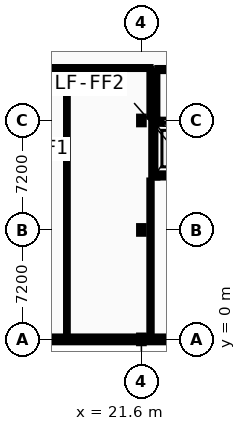
"""IFC4 building model, lengths in metres.
Left out: names, types, materials, properties, quantities, classifications, styles, units other than length and angle.
Written with IfcOpenShell. Run it as: python <this file> out.ifc"""

import sys

from ifc_helpers import new_model, si_unit, direction, frame, frame_2d, origin, origin_2d, place, context, subcontext, project, spatial, rectangle, i_section, extrude, element, fill, save


model = new_model("IFC4")
c1 = context("Model", 3, precision=1e-05, world=origin(), true_north=direction((0.0, 1.0)))
c2 = subcontext(c1, "Body", "Model", "MODEL_VIEW")
j1 = project(units=[si_unit("LENGTHUNIT", "METRE"), si_unit("PLANEANGLEUNIT", "RADIAN")], contexts=[c1])
p1 = place(None, origin())
s1 = spatial("IfcSite", under=j1, at=p1, CompositionType="ELEMENT")
p2 = place(p1, origin())
s2 = spatial("IfcBuilding", under=s1, at=p2, CompositionType="ELEMENT")
p3 = place(p2, frame((0.0, 0.0, 5.2)))
s3 = spatial("IfcBuildingStorey", under=s2, at=p3, CompositionType="ELEMENT", Elevation=5.2)
for number, where, z_axis, x_axis in (
    (1, (21.6, 0.0, 0.0), (0.0, 0.0, 1.0), (1.0, 0.0, 0.0)),
    (2, (21.6, 7.2, 0.0), (0.0, 0.0, 1.0), (1.0, 0.0, 0.0)),
    (3, (21.6, 14.4, 0.0), (0.0, 0.0, 1.0), (1.0, 0.0, 0.0)),
):
    element("IfcColumn", number, at=place(p3, frame(where, z_axis=z_axis, x_axis=x_axis)), inside=s3, PredefinedType="COLUMN", context=c2, shape_type="SweptSolid", body=[
        extrude(i_section(OverallWidth=0.3, OverallDepth=0.5, WebThickness=0.014, FlangeThickness=0.028, FilletRadius=0.027, at=origin_2d()), origin(), (0.0, 0.0, 1.0), 4.4),
    ])
p4 = place(p3, frame((14.4, 0.0, 0.0), z_axis=(0.0, 0.0, 1.0), x_axis=(1.0, 0.0, 0.0)))
e4 = element("IfcWall", 4, at=p4, inside=s3, PredefinedType="STANDARD", context=c2, shape_type="SweptSolid", body=[
    extrude(rectangle(XDim=7.2, YDim=0.38, at=frame_2d((3.6, 0.0))), origin(), (0.0, 0.0, 1.0), 3.88),
])
p5 = place(p3, frame((21.6, 0.0, 0.0), z_axis=(0.0, 0.0, 1.0), x_axis=(1.0, 0.0, 0.0)))
e5 = element("IfcWall", 5, at=p5, inside=s3, PredefinedType="STANDARD", context=c2, shape_type="SweptSolid", body=[
    extrude(rectangle(XDim=7.01, YDim=0.38, at=frame_2d((3.505, 0.0))), origin(), (0.0, 0.0, 1.0), 3.88),
])
p6 = place(p5, frame((1.537, 0.0, 0.95)))
e6 = element("IfcOpeningElement", 6, at=p6, cuts=e5, PredefinedType="OPENING", context=c2, shape_type="SweptSolid", body=[
    extrude(rectangle(XDim=1.132, YDim=1.26, at=frame_2d((0.566, 0.63))), frame((0.0, 0.2, 0.0), z_axis=(0.0, -1.0, 0.0), x_axis=(1.0, 0.0, 0.0)), (0.0, 0.0, 1.0), 0.4),
])
p7 = place(p5, frame((4.341, 0.0, 0.95)))
e7 = element("IfcOpeningElement", 7, at=p7, cuts=e5, PredefinedType="OPENING", context=c2, shape_type="SweptSolid", body=[
    extrude(rectangle(XDim=1.132, YDim=1.26, at=frame_2d((0.566, 0.63))), frame((0.0, 0.2, 0.0), z_axis=(0.0, -1.0, 0.0), x_axis=(1.0, 0.0, 0.0)), (0.0, 0.0, 1.0), 0.4),
])
p8 = place(p3, frame((22.65, 10.85, 0.0), z_axis=(0.0, 0.0, 1.0), x_axis=(1.0, 0.0, 0.0)))
e8 = element("IfcWall", 8, at=p8, inside=s3, PredefinedType="SHEAR", context=c2, shape_type="SweptSolid", body=[
    extrude(rectangle(XDim=2.2, YDim=0.4, at=frame_2d((1.1, 0.0))), origin(), (0.0, 0.0, 1.0), 4.185),
])
p9 = place(p3, frame((22.65, 14.25, 0.0), z_axis=(0.0, 0.0, 1.0), x_axis=(1.0, 0.0, 0.0)))
e9 = element("IfcWall", 9, at=p9, inside=s3, PredefinedType="SHEAR", context=c2, shape_type="SweptSolid", body=[
    extrude(rectangle(XDim=2.2, YDim=0.4, at=frame_2d((1.1, 0.0))), origin(), (0.0, 0.0, 1.0), 4.185),
])
p10 = place(p9, frame((0.4, 0.0, 0.0)))
e10 = element("IfcOpeningElement", 10, at=p10, cuts=e9, PredefinedType="OPENING", context=c2, shape_type="SweptSolid", body=[
    extrude(rectangle(XDim=1.4, YDim=2.2, at=frame_2d((0.7, 1.1))), frame((0.0, 0.21, 0.0), z_axis=(0.0, -1.0, 0.0), x_axis=(1.0, 0.0, 0.0)), (0.0, 0.0, 1.0), 0.42),
])
p11 = place(p3, frame((22.45, 10.65, 0.0), z_axis=(0.0, 0.0, 1.0), x_axis=(0.0, 1.0, 0.0)))
e11 = element("IfcWall", 11, at=p11, inside=s3, PredefinedType="SHEAR", context=c2, shape_type="SweptSolid", body=[
    extrude(rectangle(XDim=3.8, YDim=0.4, at=frame_2d((1.9, 0.0))), origin(), (0.0, 0.0, 1.0), 4.185),
])
p12 = place(p3, frame((22.65, 17.75, 0.0), z_axis=(0.0, 0.0, 1.0), x_axis=(1.0, 0.0, 0.0)))
e12 = element("IfcWall", 12, at=p12, inside=s3, PredefinedType="PARTITIONING", context=c2, shape_type="SweptSolid", body=[
    extrude(rectangle(XDim=5.75, YDim=0.2, at=frame_2d((2.875, 0.0))), origin(), (0.0, 0.0, 1.0), 4.185),
])
p13 = place(p12, frame((2.075, 0.0, 0.0)))
e13 = element("IfcOpeningElement", 13, at=p13, cuts=e12, PredefinedType="OPENING", context=c2, shape_type="SweptSolid", body=[
    extrude(rectangle(XDim=1.6, YDim=2.2, at=frame_2d((0.8, 1.1))), frame((0.0, 0.11, 0.0), z_axis=(0.0, -1.0, 0.0), x_axis=(1.0, 0.0, 0.0)), (0.0, 0.0, 1.0), 0.22),
])
p14 = place(p3, frame((22.55, 14.45, 0.0), z_axis=(0.0, 0.0, 1.0), x_axis=(0.0, 1.0, 0.0)))
e14 = element("IfcWall", 14, at=p14, inside=s3, PredefinedType="PARTITIONING", context=c2, shape_type="SweptSolid", body=[
    extrude(rectangle(XDim=3.2, YDim=0.2, at=frame_2d((1.6, 0.0))), origin(), (0.0, 0.0, 1.0), 4.185),
])
p15 = place(p3, frame((9.45, 17.85, 0.0), z_axis=(0.0, 0.0, 1.0), x_axis=(1.0, 0.0, 0.0)))
e15 = element("IfcWall", 15, at=p15, inside=s3, PredefinedType="PARTITIONING", context=c2, shape_type="SweptSolid", body=[
    extrude(rectangle(XDim=12.75, YDim=0.125, at=frame_2d((6.375, 0.0))), origin(), (0.0, 0.0, 1.0), 4.185),
])
p16 = place(p15, frame((1.2, 0.0, 0.0)))
e16 = element("IfcOpeningElement", 16, at=p16, cuts=e15, PredefinedType="OPENING", context=c2, shape_type="SweptSolid", body=[
    extrude(rectangle(XDim=1.0, YDim=2.1, at=frame_2d((0.5, 1.05))), frame((0.0, 0.073, 0.0), z_axis=(0.0, -1.0, 0.0), x_axis=(1.0, 0.0, 0.0)), (0.0, 0.0, 1.0), 0.145),
])
p17 = place(p15, frame((5.9, 0.0, 0.0)))
e17 = element("IfcOpeningElement", 17, at=p17, cuts=e15, PredefinedType="OPENING", context=c2, shape_type="SweptSolid", body=[
    extrude(rectangle(XDim=0.9, YDim=2.1, at=frame_2d((0.45, 1.05))), frame((0.0, 0.073, 0.0), z_axis=(0.0, -1.0, 0.0), x_axis=(1.0, 0.0, 0.0)), (0.0, 0.0, 1.0), 0.145),
])
p18 = place(p15, frame((7.7, 0.0, 0.0)))
e18 = element("IfcOpeningElement", 18, at=p18, cuts=e15, PredefinedType="OPENING", context=c2, shape_type="SweptSolid", body=[
    extrude(rectangle(XDim=1.192, YDim=2.096, at=frame_2d((0.596, 1.048))), frame((0.0, 0.073, 0.0), z_axis=(0.0, -1.0, 0.0), x_axis=(1.0, 0.0, 0.0)), (0.0, 0.0, 1.0), 0.145),
])
p19 = place(p3, frame((16.7, 0.2, 0.0), z_axis=(0.0, 0.0, 1.0), x_axis=(0.0, 1.0, 0.0)))
e19 = element("IfcWall", 19, at=p19, inside=s3, PredefinedType="PARTITIONING", context=c2, shape_type="SweptSolid", body=[
    extrude(rectangle(XDim=17.588, YDim=0.11, at=frame_2d((8.794, 0.0))), origin(), (0.0, 0.0, 1.0), 3.9),
])
p20 = place(p3, frame((22.2, 0.2, 0.0), z_axis=(0.0, 0.0, 1.0), x_axis=(0.0, 1.0, 0.0)))
e20 = element("IfcWall", 20, at=p20, inside=s3, PredefinedType="PARTITIONING", context=c2, shape_type="SweptSolid", body=[
    extrude(rectangle(XDim=10.25, YDim=0.15, at=frame_2d((5.125, 0.0))), origin(), (0.0, 0.0, 1.0), 4.185),
])
p21 = place(p3, frame((22.2, 14.65, 0.0), z_axis=(0.0, 0.0, 1.0), x_axis=(0.0, 1.0, 0.0)))
e21 = element("IfcWall", 21, at=p21, inside=s3, PredefinedType="PARTITIONING", context=c2, shape_type="SweptSolid", body=[
    extrude(rectangle(XDim=3.138, YDim=0.142, at=frame_2d((1.569, 0.0))), origin(), (0.0, 0.0, 1.0), 4.185),
])
p22 = place(p6, origin())
e22 = element("IfcWindow", 22, at=p22, inside=s3, PartitioningType="SINGLE_PANEL", PredefinedType="WINDOW", context=c2, shape_type="SweptSolid", body=[
    extrude(rectangle(XDim=1.132, YDim=1.26, at=frame_2d((0.566, 0.63))), frame((0.0, 0.03, 0.0), z_axis=(0.0, -1.0, 0.0), x_axis=(1.0, 0.0, 0.0)), (0.0, 0.0, 1.0), 0.06),
])
fill(e6, e22)
p23 = place(p10, origin())
e23 = element("IfcDoor", 23, at=p23, inside=s3, OperationType="SLIDING_TO_LEFT", PredefinedType="DOOR", context=c2, shape_type="SweptSolid", body=[
    extrude(rectangle(XDim=1.4, YDim=2.2, at=frame_2d((0.7, 1.1))), frame((0.0, 0.025, 0.0), z_axis=(0.0, -1.0, 0.0), x_axis=(1.0, 0.0, 0.0)), (0.0, 0.0, 1.0), 0.05),
])
fill(e10, e23)
p24 = place(p17, origin())
e24 = element("IfcDoor", 24, at=p24, inside=s3, OperationType="SINGLE_SWING_RIGHT", PredefinedType="DOOR", context=c2, shape_type="SweptSolid", body=[
    extrude(rectangle(XDim=0.9, YDim=2.1, at=frame_2d((0.45, 1.05))), frame((0.0, 0.025, 0.0), z_axis=(0.0, -1.0, 0.0), x_axis=(1.0, 0.0, 0.0)), (0.0, 0.0, 1.0), 0.05),
])
fill(e17, e24)
p25 = place(p18, origin())
e25 = element("IfcDoor", 25, at=p25, inside=s3, OperationType="SINGLE_SWING_RIGHT", PredefinedType="DOOR", context=c2, shape_type="SweptSolid", body=[
    extrude(rectangle(XDim=1.192, YDim=2.096, at=frame_2d((0.596, 1.048))), frame((0.0, 0.025, 0.0), z_axis=(0.0, -1.0, 0.0), x_axis=(1.0, 0.0, 0.0)), (0.0, 0.0, 1.0), 0.05),
])
fill(e18, e25)
save(model, sys.argv[1])
